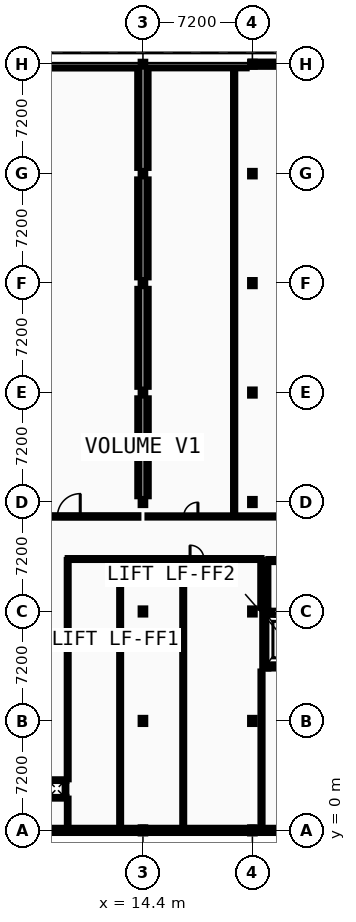
"""IFC4 building model, lengths in metres.
Left out: names, types, materials, properties, quantities, classifications, styles, units other than length and angle.
Written with IfcOpenShell. Run it as: python <this file> out.ifc"""

import sys

from ifc_helpers import new_model, si_unit, direction, frame, frame_2d, origin, origin_2d, place, context, subcontext, project, spatial, rectangle, i_section, extrude, element, fill, save


model = new_model("IFC4")
c1 = context("Model", 3, precision=1e-05, world=origin(), true_north=direction((0.0, 1.0)))
c2 = subcontext(c1, "Body", "Model", "MODEL_VIEW")
j1 = project(units=[si_unit("LENGTHUNIT", "METRE"), si_unit("PLANEANGLEUNIT", "RADIAN")], contexts=[c1])
p1 = place(None, origin())
s1 = spatial("IfcSite", under=j1, at=p1, CompositionType="ELEMENT")
p2 = place(p1, origin())
s2 = spatial("IfcBuilding", under=s1, at=p2, CompositionType="ELEMENT")
p3 = place(p2, frame((0.0, 0.0, 14.0)))
s3 = spatial("IfcBuildingStorey", under=s2, at=p3, CompositionType="ELEMENT", Elevation=14.0)
for number, where, z_axis, x_axis in (
    (1, (14.4, 0.0, 0.0), (0.0, 0.0, 1.0), (1.0, 0.0, 0.0)),
    (2, (14.4, 7.2, 0.0), (0.0, 0.0, 1.0), (1.0, 0.0, 0.0)),
    (3, (14.4, 14.4, 0.0), (0.0, 0.0, 1.0), (1.0, 0.0, 0.0)),
    (4, (14.4, 21.6, 0.0), (0.0, 0.0, 1.0), (1.0, 0.0, 0.0)),
    (5, (14.4, 28.8, 0.0), (0.0, 0.0, 1.0), (1.0, 0.0, 0.0)),
    (6, (14.4, 36.0, 0.0), (0.0, 0.0, 1.0), (1.0, 0.0, 0.0)),
):
    element("IfcColumn", number, at=place(p3, frame(where, z_axis=z_axis, x_axis=x_axis)), inside=s3, PredefinedType="COLUMN", context=c2, shape_type="SweptSolid", body=[
        extrude(i_section(OverallWidth=0.3, OverallDepth=0.4, WebThickness=0.013, FlangeThickness=0.024, FilletRadius=0.027, at=origin_2d()), origin(), (0.0, 0.0, 1.0), 4.4),
    ])
p4 = place(p3, frame((14.4, 43.2, 0.0), z_axis=(0.0, 0.0, 1.0), x_axis=(1.0, 0.0, 0.0)))
e7 = element("IfcColumn", 7, at=p4, inside=s3, PredefinedType="COLUMN", context=c2, shape_type="SweptSolid", body=[
    extrude(i_section(OverallWidth=0.3, OverallDepth=0.36, WebThickness=0.012, FlangeThickness=0.022, FilletRadius=0.027, at=origin_2d()), origin(), (0.0, 0.0, 1.0), 4.4),
])
p5 = place(p3, frame((14.4, 50.4, 0.0), z_axis=(0.0, 0.0, 1.0), x_axis=(1.0, 0.0, 0.0)))
e8 = element("IfcColumn", 8, at=p5, inside=s3, PredefinedType="COLUMN", context=c2, shape_type="SweptSolid", body=[
    extrude(i_section(OverallWidth=0.3, OverallDepth=0.32, WebThickness=0.011, FlangeThickness=0.021, FilletRadius=0.027, at=origin_2d()), origin(), (0.0, 0.0, 1.0), 4.4),
])
for number, where, z_axis, x_axis in (
    (9, (21.6, 0.0, 0.0), (0.0, 0.0, 1.0), (1.0, 0.0, 0.0)),
    (10, (21.6, 7.2, 0.0), (0.0, 0.0, 1.0), (1.0, 0.0, 0.0)),
    (11, (21.6, 14.4, 0.0), (0.0, 0.0, 1.0), (1.0, 0.0, 0.0)),
    (12, (21.6, 21.6, 0.0), (0.0, 0.0, 1.0), (1.0, 0.0, 0.0)),
    (13, (21.6, 28.8, 0.0), (0.0, 0.0, 1.0), (1.0, 0.0, 0.0)),
    (14, (21.6, 36.0, 0.0), (0.0, 0.0, 1.0), (1.0, 0.0, 0.0)),
):
    element("IfcColumn", number, at=place(p3, frame(where, z_axis=z_axis, x_axis=x_axis)), inside=s3, PredefinedType="COLUMN", context=c2, shape_type="SweptSolid", body=[
        extrude(i_section(OverallWidth=0.3, OverallDepth=0.4, WebThickness=0.013, FlangeThickness=0.024, FilletRadius=0.027, at=origin_2d()), origin(), (0.0, 0.0, 1.0), 4.4),
    ])
p6 = place(p3, frame((21.6, 43.2, 0.0), z_axis=(0.0, 0.0, 1.0), x_axis=(1.0, 0.0, 0.0)))
e15 = element("IfcColumn", 15, at=p6, inside=s3, PredefinedType="COLUMN", context=c2, shape_type="SweptSolid", body=[
    extrude(i_section(OverallWidth=0.3, OverallDepth=0.36, WebThickness=0.012, FlangeThickness=0.022, FilletRadius=0.027, at=origin_2d()), origin(), (0.0, 0.0, 1.0), 4.4),
])
p7 = place(p3, frame((21.6, 50.4, 0.0), z_axis=(0.0, 0.0, 1.0), x_axis=(1.0, 0.0, 0.0)))
e16 = element("IfcColumn", 16, at=p7, inside=s3, PredefinedType="COLUMN", context=c2, shape_type="SweptSolid", body=[
    extrude(i_section(OverallWidth=0.3, OverallDepth=0.32, WebThickness=0.011, FlangeThickness=0.021, FilletRadius=0.027, at=origin_2d()), origin(), (0.0, 0.0, 1.0), 4.4),
])
p8 = place(p3, frame((7.2, 0.0, 0.0), z_axis=(0.0, 0.0, 1.0), x_axis=(1.0, 0.0, 0.0)))
e17 = element("IfcWall", 17, at=p8, inside=s3, PredefinedType="STANDARD", context=c2, shape_type="SweptSolid", body=[
    extrude(rectangle(XDim=7.2, YDim=0.34, at=frame_2d((3.6, 0.0))), origin(), (0.0, 0.0, 1.0), 3.935),
])
p9 = place(p3, frame((14.4, 0.0, 0.0), z_axis=(0.0, 0.0, 1.0), x_axis=(1.0, 0.0, 0.0)))
e18 = element("IfcWall", 18, at=p9, inside=s3, PredefinedType="STANDARD", context=c2, shape_type="SweptSolid", body=[
    extrude(rectangle(XDim=7.2, YDim=0.34, at=frame_2d((3.6, 0.0))), origin(), (0.0, 0.0, 1.0), 3.935),
])
p10 = place(p9, frame((4.457, 0.0, 0.95)))
e19 = element("IfcOpeningElement", 19, at=p10, cuts=e18, PredefinedType="OPENING", context=c2, shape_type="SweptSolid", body=[
    extrude(rectangle(XDim=1.166, YDim=1.332, at=frame_2d((0.583, 0.666))), frame((0.0, 0.18, 0.0), z_axis=(0.0, -1.0, 0.0), x_axis=(1.0, 0.0, 0.0)), (0.0, 0.0, 1.0), 0.36),
])
p11 = place(p3, frame((21.6, 0.0, 0.0), z_axis=(0.0, 0.0, 1.0), x_axis=(1.0, 0.0, 0.0)))
e20 = element("IfcWall", 20, at=p11, inside=s3, PredefinedType="STANDARD", context=c2, shape_type="SweptSolid", body=[
    extrude(rectangle(XDim=7.03, YDim=0.34, at=frame_2d((3.515, 0.0))), origin(), (0.0, 0.0, 1.0), 3.935),
])
p12 = place(p11, frame((1.509, 0.0, 0.95)))
e21 = element("IfcOpeningElement", 21, at=p12, cuts=e20, PredefinedType="OPENING", context=c2, shape_type="SweptSolid", body=[
    extrude(rectangle(XDim=1.2, YDim=1.332, at=frame_2d((0.6, 0.666))), frame((0.0, 0.18, 0.0), z_axis=(0.0, -1.0, 0.0), x_axis=(1.0, 0.0, 0.0)), (0.0, 0.0, 1.0), 0.36),
])
p13 = place(p11, frame((4.321, 0.0, 0.95)))
e22 = element("IfcOpeningElement", 22, at=p13, cuts=e20, PredefinedType="OPENING", context=c2, shape_type="SweptSolid", body=[
    extrude(rectangle(XDim=1.2, YDim=1.332, at=frame_2d((0.6, 0.666))), frame((0.0, 0.18, 0.0), z_axis=(0.0, -1.0, 0.0), x_axis=(1.0, 0.0, 0.0)), (0.0, 0.0, 1.0), 0.36),
])
p14 = place(p3, frame((28.8, 50.4, 0.0), z_axis=(0.0, 0.0, 1.0), x_axis=(-1.0, 0.0, 0.0)))
e23 = element("IfcWall", 23, at=p14, inside=s3, PredefinedType="STANDARD", context=c2, shape_type="SweptSolid", body=[
    extrude(rectangle(XDim=7.31, YDim=0.34, at=frame_2d((3.655, 0.0))), origin(), (0.0, 0.0, 1.0), 3.935),
])
p15 = place(p14, frame((1.559, 0.0, 0.95)))
e24 = element("IfcOpeningElement", 24, at=p15, cuts=e23, PredefinedType="OPENING", context=c2, shape_type="SweptSolid", body=[
    extrude(rectangle(XDim=1.268, YDim=1.332, at=frame_2d((0.634, 0.666))), frame((0.0, 0.18, 0.0), z_axis=(0.0, -1.0, 0.0), x_axis=(1.0, 0.0, 0.0)), (0.0, 0.0, 1.0), 0.36),
])
p16 = place(p14, frame((4.483, 0.0, 0.95)))
e25 = element("IfcOpeningElement", 25, at=p16, cuts=e23, PredefinedType="OPENING", context=c2, shape_type="SweptSolid", body=[
    extrude(rectangle(XDim=1.268, YDim=1.332, at=frame_2d((0.634, 0.666))), frame((0.0, 0.18, 0.0), z_axis=(0.0, -1.0, 0.0), x_axis=(1.0, 0.0, 0.0)), (0.0, 0.0, 1.0), 0.36),
])
p17 = place(p3, frame((22.65, 10.85, 0.0), z_axis=(0.0, 0.0, 1.0), x_axis=(1.0, 0.0, 0.0)))
e26 = element("IfcWall", 26, at=p17, inside=s3, PredefinedType="SHEAR", context=c2, shape_type="SweptSolid", body=[
    extrude(rectangle(XDim=2.2, YDim=0.4, at=frame_2d((1.1, 0.0))), origin(), (0.0, 0.0, 1.0), 4.2),
])
p18 = place(p3, frame((22.65, 14.25, 0.0), z_axis=(0.0, 0.0, 1.0), x_axis=(1.0, 0.0, 0.0)))
e27 = element("IfcWall", 27, at=p18, inside=s3, PredefinedType="SHEAR", context=c2, shape_type="SweptSolid", body=[
    extrude(rectangle(XDim=2.2, YDim=0.4, at=frame_2d((1.1, 0.0))), origin(), (0.0, 0.0, 1.0), 4.2),
])
p19 = place(p18, frame((0.4, 0.0, 0.0)))
e28 = element("IfcOpeningElement", 28, at=p19, cuts=e27, PredefinedType="OPENING", context=c2, shape_type="SweptSolid", body=[
    extrude(rectangle(XDim=1.4, YDim=2.2, at=frame_2d((0.7, 1.1))), frame((0.0, 0.21, 0.0), z_axis=(0.0, -1.0, 0.0), x_axis=(1.0, 0.0, 0.0)), (0.0, 0.0, 1.0), 0.42),
])
p20 = place(p3, frame((22.45, 10.65, 0.0), z_axis=(0.0, 0.0, 1.0), x_axis=(0.0, 1.0, 0.0)))
e29 = element("IfcWall", 29, at=p20, inside=s3, PredefinedType="SHEAR", context=c2, shape_type="SweptSolid", body=[
    extrude(rectangle(XDim=3.8, YDim=0.4, at=frame_2d((1.9, 0.0))), origin(), (0.0, 0.0, 1.0), 4.2),
])
p21 = place(p3, frame((22.65, 17.75, 0.0), z_axis=(0.0, 0.0, 1.0), x_axis=(1.0, 0.0, 0.0)))
e30 = element("IfcWall", 30, at=p21, inside=s3, PredefinedType="PARTITIONING", context=c2, shape_type="SweptSolid", body=[
    extrude(rectangle(XDim=5.75, YDim=0.2, at=frame_2d((2.875, 0.0))), origin(), (0.0, 0.0, 1.0), 4.2),
])
p22 = place(p21, frame((2.075, 0.0, 0.0)))
e31 = element("IfcOpeningElement", 31, at=p22, cuts=e30, PredefinedType="OPENING", context=c2, shape_type="SweptSolid", body=[
    extrude(rectangle(XDim=1.6, YDim=2.2, at=frame_2d((0.8, 1.1))), frame((0.0, 0.11, 0.0), z_axis=(0.0, -1.0, 0.0), x_axis=(1.0, 0.0, 0.0)), (0.0, 0.0, 1.0), 0.22),
])
p23 = place(p3, frame((22.55, 14.45, 0.0), z_axis=(0.0, 0.0, 1.0), x_axis=(0.0, 1.0, 0.0)))
e32 = element("IfcWall", 32, at=p23, inside=s3, PredefinedType="PARTITIONING", context=c2, shape_type="SweptSolid", body=[
    extrude(rectangle(XDim=3.2, YDim=0.2, at=frame_2d((1.6, 0.0))), origin(), (0.0, 0.0, 1.0), 4.2),
])
for number, where, z_axis, x_axis in (
    (33, (8.09, 2.145, 0.0), (0.0, 0.0, 1.0), (1.0, 0.0, 0.0)),
    (34, (8.09, 3.305, 0.0), (0.0, 0.0, 1.0), (1.0, 0.0, 0.0)),
):
    element("IfcWall", number, at=place(p3, frame(where, z_axis=z_axis, x_axis=x_axis)), inside=s3, PredefinedType="PARTITIONING", context=c2, shape_type="SweptSolid", body=[
        extrude(rectangle(XDim=1.27, YDim=0.11, at=frame_2d((0.635, 0.0))), origin(), (0.0, 0.0, 1.0), 4.2),
    ])
p24 = place(p3, frame((9.305, 2.2, 0.0), z_axis=(0.0, 0.0, 1.0), x_axis=(0.0, 1.0, 0.0)))
e35 = element("IfcWall", 35, at=p24, inside=s3, PredefinedType="PARTITIONING", context=c2, shape_type="SweptSolid", body=[
    extrude(rectangle(XDim=1.05, YDim=0.11, at=frame_2d((0.525, 0.0))), origin(), (0.0, 0.0, 1.0), 4.2),
])
p25 = place(p3, frame((9.45, 17.85, 0.0), z_axis=(0.0, 0.0, 1.0), x_axis=(1.0, 0.0, 0.0)))
e36 = element("IfcWall", 36, at=p25, inside=s3, PredefinedType="PARTITIONING", context=c2, shape_type="SweptSolid", body=[
    extrude(rectangle(XDim=12.75, YDim=0.125, at=frame_2d((6.375, 0.0))), origin(), (0.0, 0.0, 1.0), 4.2),
])
p26 = place(p25, frame((1.225, 0.0, 0.0)))
e37 = element("IfcOpeningElement", 37, at=p26, cuts=e36, PredefinedType="OPENING", context=c2, shape_type="SweptSolid", body=[
    extrude(rectangle(XDim=1.0, YDim=2.1, at=frame_2d((0.5, 1.05))), frame((0.0, 0.073, 0.0), z_axis=(0.0, -1.0, 0.0), x_axis=(1.0, 0.0, 0.0)), (0.0, 0.0, 1.0), 0.145),
])
p27 = place(p25, frame((6.25, 0.0, 0.0)))
e38 = element("IfcOpeningElement", 38, at=p27, cuts=e36, PredefinedType="OPENING", context=c2, shape_type="SweptSolid", body=[
    extrude(rectangle(XDim=0.9, YDim=2.1, at=frame_2d((0.45, 1.05))), frame((0.0, 0.073, 0.0), z_axis=(0.0, -1.0, 0.0), x_axis=(1.0, 0.0, 0.0)), (0.0, 0.0, 1.0), 0.145),
])
p28 = place(p25, frame((8.05, 0.0, 0.0)))
e39 = element("IfcOpeningElement", 39, at=p28, cuts=e36, PredefinedType="OPENING", context=c2, shape_type="SweptSolid", body=[
    extrude(rectangle(XDim=0.906, YDim=2.04, at=frame_2d((0.453, 1.02))), frame((0.0, 0.073, 0.0), z_axis=(0.0, -1.0, 0.0), x_axis=(1.0, 0.0, 0.0)), (0.0, 0.0, 1.0), 0.145),
])
p29 = place(p3, frame((0.2, 20.65, 0.0), z_axis=(0.0, 0.0, 1.0), x_axis=(1.0, 0.0, 0.0)))
e40 = element("IfcWall", 40, at=p29, inside=s3, PredefinedType="PARTITIONING", context=c2, shape_type="SweptSolid", body=[
    extrude(rectangle(XDim=13.9, YDim=0.16, at=frame_2d((6.95, 0.0))), origin(), (0.0, 0.0, 1.0), 4.2),
])
p30 = place(p29, frame((2.8, 0.0, 0.0)))
e41 = element("IfcOpeningElement", 41, at=p30, cuts=e40, PredefinedType="OPENING", context=c2, shape_type="SweptSolid", body=[
    extrude(rectangle(XDim=1.5, YDim=2.2, at=frame_2d((0.75, 1.1))), frame((0.0, 0.09, 0.0), z_axis=(0.0, -1.0, 0.0), x_axis=(1.0, 0.0, 0.0)), (0.0, 0.0, 1.0), 0.18),
])
p31 = place(p29, frame((8.575, 0.0, 0.0)))
e42 = element("IfcOpeningElement", 42, at=p31, cuts=e40, PredefinedType="OPENING", context=c2, shape_type="SweptSolid", body=[
    extrude(rectangle(XDim=1.5, YDim=2.2, at=frame_2d((0.75, 1.1))), frame((0.0, 0.09, 0.0), z_axis=(0.0, -1.0, 0.0), x_axis=(1.0, 0.0, 0.0)), (0.0, 0.0, 1.0), 0.18),
])
p32 = place(p3, frame((14.7, 20.65, 0.0), z_axis=(0.0, 0.0, 1.0), x_axis=(1.0, 0.0, 0.0)))
e43 = element("IfcWall", 43, at=p32, inside=s3, PredefinedType="PARTITIONING", context=c2, shape_type="SweptSolid", body=[
    extrude(rectangle(XDim=13.9, YDim=0.142, at=frame_2d((6.95, 0.0))), origin(), (0.0, 0.0, 1.0), 4.2),
])
p33 = place(p32, frame((2.384, 0.0, 0.0)))
e44 = element("IfcOpeningElement", 44, at=p33, cuts=e43, PredefinedType="OPENING", context=c2, shape_type="SweptSolid", body=[
    extrude(rectangle(XDim=0.932, YDim=2.04, at=frame_2d((0.466, 1.02))), frame((0.0, 0.081, 0.0), z_axis=(0.0, -1.0, 0.0), x_axis=(1.0, 0.0, 0.0)), (0.0, 0.0, 1.0), 0.162),
])
p34 = place(p32, frame((9.05, 0.0, 0.0)))
e45 = element("IfcOpeningElement", 45, at=p34, cuts=e43, PredefinedType="OPENING", context=c2, shape_type="SweptSolid", body=[
    extrude(rectangle(XDim=1.5, YDim=2.2, at=frame_2d((0.75, 1.1))), frame((0.0, 0.081, 0.0), z_axis=(0.0, -1.0, 0.0), x_axis=(1.0, 0.0, 0.0)), (0.0, 0.0, 1.0), 0.162),
])
p35 = place(p3, frame((7.58, 50.2, 0.0), z_axis=(0.0, 0.0, 1.0), x_axis=(1.0, 0.0, 0.0)))
e46 = element("IfcWall", 46, at=p35, inside=s3, PredefinedType="PARTITIONING", context=c2, shape_type="SweptSolid", body=[
    extrude(rectangle(XDim=6.44, YDim=0.16, at=frame_2d((3.22, 0.0))), origin(), (0.0, 0.0, 1.0), 3.935),
])
p36 = place(p3, frame((14.78, 50.2, 0.0), z_axis=(0.0, 0.0, 1.0), x_axis=(1.0, 0.0, 0.0)))
e47 = element("IfcWall", 47, at=p36, inside=s3, PredefinedType="PARTITIONING", context=c2, shape_type="SweptSolid", body=[
    extrude(rectangle(XDim=6.44, YDim=0.142, at=frame_2d((3.22, 0.0))), origin(), (0.0, 0.0, 1.0), 3.935),
])
p37 = place(p3, frame((9.45, 0.2, 0.0), z_axis=(0.0, 0.0, 1.0), x_axis=(0.0, 1.0, 0.0)))
e48 = element("IfcWall", 48, at=p37, inside=s3, PredefinedType="PARTITIONING", context=c2, shape_type="SweptSolid", body=[
    extrude(rectangle(XDim=1.89, YDim=0.11, at=frame_2d((0.945, 0.0))), origin(), (0.0, 0.0, 1.0), 3.945),
])
p38 = place(p3, frame((9.45, 3.36, 0.0), z_axis=(0.0, 0.0, 1.0), x_axis=(0.0, 1.0, 0.0)))
e49 = element("IfcWall", 49, at=p38, inside=s3, PredefinedType="PARTITIONING", context=c2, shape_type="SweptSolid", body=[
    extrude(rectangle(XDim=14.427, YDim=0.125, at=frame_2d((7.214, 0.0))), origin(), (0.0, 0.0, 1.0), 3.945),
])
p39 = place(p3, frame((12.9, 0.2, 0.0), z_axis=(0.0, 0.0, 1.0), x_axis=(0.0, 1.0, 0.0)))
e50 = element("IfcWall", 50, at=p39, inside=s3, PredefinedType="PARTITIONING", context=c2, shape_type="SweptSolid", body=[
    extrude(rectangle(XDim=17.588, YDim=0.125, at=frame_2d((8.794, 0.0))), origin(), (0.0, 0.0, 1.0), 4.2),
])
p40 = place(p3, frame((14.1, 21.98, 0.0), z_axis=(0.0, 0.0, 1.0), x_axis=(0.0, 1.0, 0.0)))
e51 = element("IfcWall", 51, at=p40, inside=s3, PredefinedType="PARTITIONING", context=c2, shape_type="SweptSolid", body=[
    extrude(rectangle(XDim=6.44, YDim=0.142, at=frame_2d((3.22, 0.0))), origin(), (0.0, 0.0, 1.0), 3.895),
])
p41 = place(p3, frame((14.1, 29.18, 0.0), z_axis=(0.0, 0.0, 1.0), x_axis=(0.0, 1.0, 0.0)))
e52 = element("IfcWall", 52, at=p41, inside=s3, PredefinedType="PARTITIONING", context=c2, shape_type="SweptSolid", body=[
    extrude(rectangle(XDim=6.44, YDim=0.135, at=frame_2d((3.22, 0.0))), origin(), (0.0, 0.0, 1.0), 4.2),
])
p42 = place(p3, frame((14.1, 36.38, 0.0), z_axis=(0.0, 0.0, 1.0), x_axis=(0.0, 1.0, 0.0)))
e53 = element("IfcWall", 53, at=p42, inside=s3, PredefinedType="PARTITIONING", context=c2, shape_type="SweptSolid", body=[
    extrude(rectangle(XDim=6.44, YDim=0.16, at=frame_2d((3.22, 0.0))), origin(), (0.0, 0.0, 1.0), 3.895),
])
p43 = place(p3, frame((14.1, 43.58, 0.0), z_axis=(0.0, 0.0, 1.0), x_axis=(0.0, 1.0, 0.0)))
e54 = element("IfcWall", 54, at=p43, inside=s3, PredefinedType="PARTITIONING", context=c2, shape_type="SweptSolid", body=[
    extrude(rectangle(XDim=6.44, YDim=0.15, at=frame_2d((3.22, 0.0))), origin(), (0.0, 0.0, 1.0), 3.895),
])
p44 = place(p3, frame((14.7, 21.98, 0.0), z_axis=(0.0, 0.0, 1.0), x_axis=(0.0, 1.0, 0.0)))
e55 = element("IfcWall", 55, at=p44, inside=s3, PredefinedType="PARTITIONING", context=c2, shape_type="SweptSolid", body=[
    extrude(rectangle(XDim=6.44, YDim=0.16, at=frame_2d((3.22, 0.0))), origin(), (0.0, 0.0, 1.0), 3.895),
])
p45 = place(p3, frame((14.7, 29.18, 0.0), z_axis=(0.0, 0.0, 1.0), x_axis=(0.0, 1.0, 0.0)))
e56 = element("IfcWall", 56, at=p45, inside=s3, PredefinedType="PARTITIONING", context=c2, shape_type="SweptSolid", body=[
    extrude(rectangle(XDim=6.44, YDim=0.15, at=frame_2d((3.22, 0.0))), origin(), (0.0, 0.0, 1.0), 3.895),
])
p46 = place(p3, frame((14.7, 36.38, 0.0), z_axis=(0.0, 0.0, 1.0), x_axis=(0.0, 1.0, 0.0)))
e57 = element("IfcWall", 57, at=p46, inside=s3, PredefinedType="PARTITIONING", context=c2, shape_type="SweptSolid", body=[
    extrude(rectangle(XDim=6.44, YDim=0.142, at=frame_2d((3.22, 0.0))), origin(), (0.0, 0.0, 1.0), 3.895),
])
p47 = place(p3, frame((14.7, 43.58, 0.0), z_axis=(0.0, 0.0, 1.0), x_axis=(0.0, 1.0, 0.0)))
e58 = element("IfcWall", 58, at=p47, inside=s3, PredefinedType="PARTITIONING", context=c2, shape_type="SweptSolid", body=[
    extrude(rectangle(XDim=6.44, YDim=0.135, at=frame_2d((3.22, 0.0))), origin(), (0.0, 0.0, 1.0), 4.2),
])
p48 = place(p3, frame((17.05, 0.2, 0.0), z_axis=(0.0, 0.0, 1.0), x_axis=(0.0, 1.0, 0.0)))
e59 = element("IfcWall", 59, at=p48, inside=s3, PredefinedType="PARTITIONING", context=c2, shape_type="SweptSolid", body=[
    extrude(rectangle(XDim=17.588, YDim=0.125, at=frame_2d((8.794, 0.0))), origin(), (0.0, 0.0, 1.0), 4.2),
])
p49 = place(p3, frame((20.4, 20.721, 0.0), z_axis=(0.0, 0.0, 1.0), x_axis=(0.0, 1.0, 0.0)))
e60 = element("IfcWall", 60, at=p49, inside=s3, PredefinedType="PARTITIONING", context=c2, shape_type="SweptSolid", body=[
    extrude(rectangle(XDim=29.408, YDim=0.142, at=frame_2d((14.704, 0.0))), origin(), (0.0, 0.0, 1.0), 4.2),
])
p50 = place(p3, frame((22.2, 0.2, 0.0), z_axis=(0.0, 0.0, 1.0), x_axis=(0.0, 1.0, 0.0)))
e61 = element("IfcWall", 61, at=p50, inside=s3, PredefinedType="PARTITIONING", context=c2, shape_type="SweptSolid", body=[
    extrude(rectangle(XDim=10.25, YDim=0.135, at=frame_2d((5.125, 0.0))), origin(), (0.0, 0.0, 1.0), 4.2),
])
p51 = place(p3, frame((22.2, 14.65, 0.0), z_axis=(0.0, 0.0, 1.0), x_axis=(0.0, 1.0, 0.0)))
e62 = element("IfcWall", 62, at=p51, inside=s3, PredefinedType="PARTITIONING", context=c2, shape_type="SweptSolid", body=[
    extrude(rectangle(XDim=3.138, YDim=0.16, at=frame_2d((1.569, 0.0))), origin(), (0.0, 0.0, 1.0), 4.2),
])
p52 = place(p10, origin())
e63 = element("IfcWindow", 63, at=p52, inside=s3, PartitioningType="SINGLE_PANEL", PredefinedType="WINDOW", context=c2, shape_type="SweptSolid", body=[
    extrude(rectangle(XDim=1.166, YDim=1.332, at=frame_2d((0.583, 0.666))), frame((0.0, 0.03, 0.0), z_axis=(0.0, -1.0, 0.0), x_axis=(1.0, 0.0, 0.0)), (0.0, 0.0, 1.0), 0.06),
])
fill(e19, e63)
p53 = place(p12, origin())
e64 = element("IfcWindow", 64, at=p53, inside=s3, PartitioningType="SINGLE_PANEL", PredefinedType="WINDOW", context=c2, shape_type="SweptSolid", body=[
    extrude(rectangle(XDim=1.2, YDim=1.332, at=frame_2d((0.6, 0.666))), frame((0.0, 0.03, 0.0), z_axis=(0.0, -1.0, 0.0), x_axis=(1.0, 0.0, 0.0)), (0.0, 0.0, 1.0), 0.06),
])
fill(e21, e64)
p54 = place(p16, origin())
e65 = element("IfcWindow", 65, at=p54, inside=s3, PartitioningType="SINGLE_PANEL", PredefinedType="WINDOW", context=c2, shape_type="SweptSolid", body=[
    extrude(rectangle(XDim=1.268, YDim=1.332, at=frame_2d((0.634, 0.666))), frame((0.0, 0.03, 0.0), z_axis=(0.0, -1.0, 0.0), x_axis=(1.0, 0.0, 0.0)), (0.0, 0.0, 1.0), 0.06),
])
fill(e25, e65)
p55 = place(p19, origin())
e66 = element("IfcDoor", 66, at=p55, inside=s3, OperationType="SLIDING_TO_LEFT", PredefinedType="DOOR", context=c2, shape_type="SweptSolid", body=[
    extrude(rectangle(XDim=1.4, YDim=2.2, at=frame_2d((0.7, 1.1))), frame((0.0, 0.025, 0.0), z_axis=(0.0, -1.0, 0.0), x_axis=(1.0, 0.0, 0.0)), (0.0, 0.0, 1.0), 0.05),
])
fill(e28, e66)
p56 = place(p26, origin())
e67 = element("IfcDoor", 67, at=p56, inside=s3, OperationType="SLIDING_TO_LEFT", PredefinedType="DOOR", context=c2, shape_type="SweptSolid", body=[
    extrude(rectangle(XDim=1.0, YDim=2.1, at=frame_2d((0.5, 1.05))), frame((0.0, 0.025, 0.0), z_axis=(0.0, -1.0, 0.0), x_axis=(1.0, 0.0, 0.0)), (0.0, 0.0, 1.0), 0.05),
])
fill(e37, e67)
p57 = place(p27, origin())
e68 = element("IfcDoor", 68, at=p57, inside=s3, OperationType="SINGLE_SWING_RIGHT", PredefinedType="DOOR", context=c2, shape_type="SweptSolid", body=[
    extrude(rectangle(XDim=0.9, YDim=2.1, at=frame_2d((0.45, 1.05))), frame((0.0, 0.025, 0.0), z_axis=(0.0, -1.0, 0.0), x_axis=(1.0, 0.0, 0.0)), (0.0, 0.0, 1.0), 0.05),
])
fill(e38, e68)
p58 = place(p28, origin())
e69 = element("IfcDoor", 69, at=p58, inside=s3, OperationType="SINGLE_SWING_LEFT", PredefinedType="DOOR", context=c2, shape_type="SweptSolid", body=[
    extrude(rectangle(XDim=0.906, YDim=2.04, at=frame_2d((0.453, 1.02))), frame((0.0, 0.025, 0.0), z_axis=(0.0, -1.0, 0.0), x_axis=(1.0, 0.0, 0.0)), (0.0, 0.0, 1.0), 0.05),
])
fill(e39, e69)
p59 = place(p33, frame((0.932, 0.0, 0.0), z_axis=(0.0, 0.0, 1.0), x_axis=(-1.0, 0.0, 0.0)))
e70 = element("IfcDoor", 70, at=p59, inside=s3, OperationType="SINGLE_SWING_RIGHT", PredefinedType="DOOR", context=c2, shape_type="SweptSolid", body=[
    extrude(rectangle(XDim=0.932, YDim=2.04, at=frame_2d((0.466, 1.02))), frame((0.0, 0.025, 0.0), z_axis=(0.0, -1.0, 0.0), x_axis=(1.0, 0.0, 0.0)), (0.0, 0.0, 1.0), 0.05),
])
fill(e44, e70)
p60 = place(p31, frame((1.5, 0.0, 0.0), z_axis=(0.0, 0.0, 1.0), x_axis=(-1.0, 0.0, 0.0)))
e71 = element("IfcDoor", 71, at=p60, inside=s3, OperationType="DOUBLE_DOOR_SINGLE_SWING", PredefinedType="DOOR", context=c2, shape_type="SweptSolid", body=[
    extrude(rectangle(XDim=1.5, YDim=2.2, at=frame_2d((0.75, 1.1))), frame((0.0, 0.025, 0.0), z_axis=(0.0, -1.0, 0.0), x_axis=(1.0, 0.0, 0.0)), (0.0, 0.0, 1.0), 0.05),
])
fill(e42, e71)
save(model, sys.argv[1])
